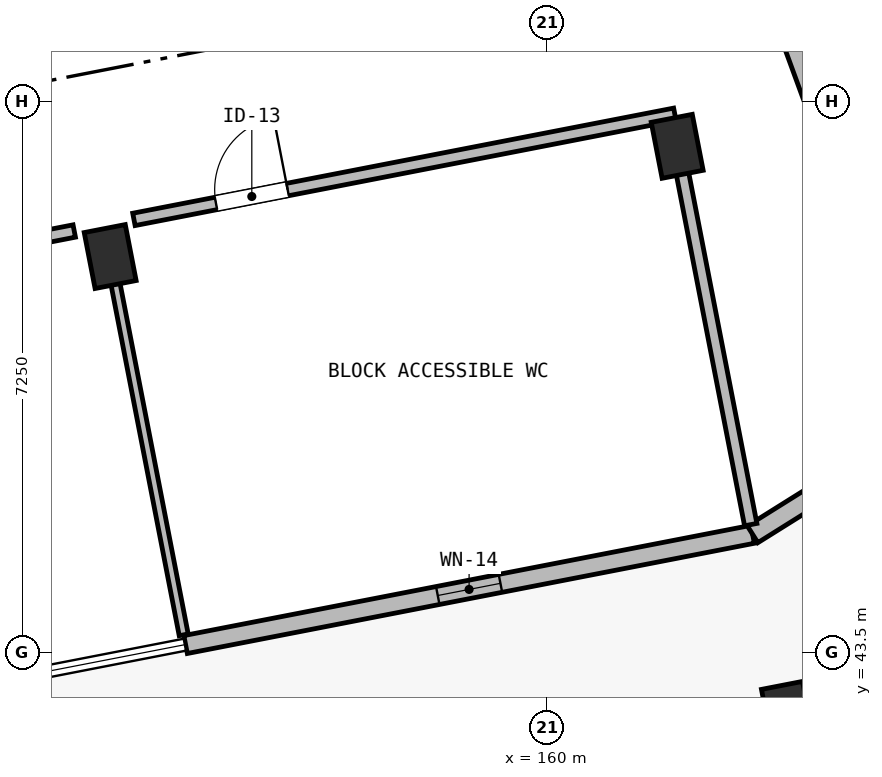
"""IFC4 building model, lengths in metres.
Left out: names, types, materials, properties, quantities, classifications, styles, units other than length and angle.
Written with IfcOpenShell. Run it as: python <this file> out.ifc"""

import sys

from ifc_helpers import new_model, si_unit, direction, frame, frame_2d, origin, origin_2d, place, context, subcontext, project, spatial, rectangle, extrude, element, fill, save


model = new_model("IFC4")
c1 = context("Model", 3, precision=1e-05, world=origin(), true_north=direction((0.0, 1.0)))
c2 = subcontext(c1, "Body", "Model", "MODEL_VIEW")
j1 = project(units=[si_unit("LENGTHUNIT", "METRE"), si_unit("PLANEANGLEUNIT", "RADIAN")], contexts=[c1])
p1 = place(None, origin())
s1 = spatial("IfcSite", under=j1, at=p1, CompositionType="ELEMENT")
p2 = place(p1, origin())
s2 = spatial("IfcBuilding", under=s1, at=p2, CompositionType="ELEMENT")
p3 = place(p2, origin())
s3 = spatial("IfcBuildingStorey", under=s2, at=p3, CompositionType="ELEMENT", Elevation=0.0)
for number, where, z_axis, x_axis in (
    (1, (154.252, 48.711, -0.35), (0.0, 0.0, 1.0), (0.982, 0.191, 0.0)),
    (2, (163.162, 42.701, -0.35), (0.0, 0.0, 1.0), (0.982, 0.191, 0.0)),
    (3, (161.712, 50.161, -0.35), (0.0, 0.0, 1.0), (0.982, 0.191, 0.0)),
):
    element("IfcColumn", number, at=place(p3, frame(where, z_axis=z_axis, x_axis=x_axis)), inside=s3, PredefinedType="COLUMN", context=c2, shape_type="SweptSolid", body=[
        extrude(rectangle(XDim=0.55, YDim=0.75, at=origin_2d()), origin(), (0.0, 0.0, 1.0), 4.85),
    ])
p4 = place(p3, frame((162.704, 45.057, 0.0), z_axis=(0.0, 0.0, 1.0), x_axis=(-0.981626422232, -0.190812911449, 0.0)))
e4 = element("IfcWall", 4, at=p4, inside=s3, PredefinedType="SOLIDWALL", context=c2, shape_type="SweptSolid", body=[
    extrude(rectangle(XDim=7.6, YDim=0.24, at=frame_2d((3.8, 0.0))), origin(), (0.0, 0.0, 1.0), 3.35),
])
p5 = place(p4, frame((3.38, 0.0, 0.55)))
e5 = element("IfcOpeningElement", 5, at=p5, cuts=e4, PredefinedType="OPENING", context=c2, shape_type="SweptSolid", body=[
    extrude(rectangle(XDim=0.84, YDim=2.28, at=frame_2d((0.42, 1.14))), frame((0.0, 0.135, 0.0), z_axis=(0.0, -1.0, 0.0), x_axis=(1.0, 0.0, 0.0)), (0.0, 0.0, 1.0), 0.27),
])
p6 = place(p3, frame((159.422, 61.941, 0.0), z_axis=(0.0, 0.0, 1.0), x_axis=(0.3439512016, -0.938987524368, 0.0)))
e6 = element("IfcWall", 6, at=p6, inside=s3, PredefinedType="SOLIDWALL", context=c2, shape_type="SweptSolid", body=[
    extrude(rectangle(XDim=16.407, YDim=0.26, at=frame_2d((8.204, 0.0))), origin(), (0.0, 0.0, 1.0), 3.35),
])
p7 = place(p3, frame((165.066, 46.534, 0.0), z_axis=(0.0, 0.0, 1.0), x_axis=(-0.84772244565, -0.53044005801, 0.0)))
e7 = element("IfcWall", 7, at=p7, inside=s3, PredefinedType="SOLIDWALL", context=c2, shape_type="SweptSolid", body=[
    extrude(rectangle(XDim=2.785, YDim=0.26, at=frame_2d((1.393, 0.0))), origin(), (0.0, 0.0, 1.0), 3.85),
])
p8 = place(p3, frame((147.104, 47.75, 0.0), z_axis=(0.0, 0.0, 1.0), x_axis=(0.981624170853, 0.190824493182, 0.0)))
e8 = element("IfcWall", 8, at=p8, inside=s3, PredefinedType="PLUMBINGWALL", context=c2, shape_type="SweptSolid", body=[
    extrude(rectangle(XDim=6.8, YDim=0.165, at=frame_2d((3.4, 0.0))), origin(), (0.0, 0.0, 1.0), 4.22),
])
p9 = place(p8, frame((1.1, 0.0, 0.0)))
e9 = element("IfcOpeningElement", 9, at=p9, cuts=e8, PredefinedType="OPENING", context=c2, shape_type="SweptSolid", body=[
    extrude(rectangle(XDim=0.86, YDim=2.1, at=frame_2d((0.43, 1.05))), frame((0.0, 0.097, 0.0), z_axis=(0.0, -1.0, 0.0), x_axis=(1.0, 0.0, 0.0)), (0.0, 0.0, 1.0), 0.195),
])
p10 = place(p3, frame((154.564, 49.2, 0.0), z_axis=(0.0, 0.0, 1.0), x_axis=(0.981628356687, 0.190802959485, 0.0)))
e10 = element("IfcWall", 10, at=p10, inside=s3, PredefinedType="PLUMBINGWALL", context=c2, shape_type="SweptSolid", body=[
    extrude(rectangle(XDim=7.25, YDim=0.165, at=frame_2d((3.625, 0.0))), origin(), (0.0, 0.0, 1.0), 4.22),
])
p11 = place(p10, frame((1.1, 0.0, 0.0)))
e11 = element("IfcOpeningElement", 11, at=p11, cuts=e10, PredefinedType="OPENING", context=c2, shape_type="SweptSolid", body=[
    extrude(rectangle(XDim=0.96, YDim=2.12, at=frame_2d((0.48, 1.06))), frame((0.0, 0.097, 0.0), z_axis=(0.0, -1.0, 0.0), x_axis=(1.0, 0.0, 0.0)), (0.0, 0.0, 1.0), 0.195),
])
p12 = place(p3, frame((155.219, 43.734, 0.0), z_axis=(0.0, 0.0, 1.0), x_axis=(-0.190784182555, 0.981632006246, 0.0)))
e12 = element("IfcWall", 12, at=p12, inside=s3, PredefinedType="PARTITIONING", context=c2, shape_type="SweptSolid", body=[
    extrude(rectangle(XDim=4.74, YDim=0.12, at=frame_2d((2.37, 0.0))), origin(), (0.0, 0.0, 1.0), 3.32),
])
p13 = place(p3, frame((162.679, 45.184, 0.0), z_axis=(0.0, 0.0, 1.0), x_axis=(-0.190824166448, 0.981624234368, 0.0)))
e13 = element("IfcWall", 13, at=p13, inside=s3, PredefinedType="PLUMBINGWALL", context=c2, shape_type="SweptSolid", body=[
    extrude(rectangle(XDim=4.74, YDim=0.165, at=frame_2d((2.37, 0.0))), origin(), (0.0, 0.0, 1.0), 3.32),
])
p14 = place(p5, origin())
e14 = element("IfcWindow", 14, at=p14, inside=s3, PartitioningType="SINGLE_PANEL", PredefinedType="WINDOW", context=c2, shape_type="SweptSolid", body=[
    extrude(rectangle(XDim=0.84, YDim=2.28, at=frame_2d((0.42, 1.14))), frame((0.0, 0.03, 0.0), z_axis=(0.0, -1.0, 0.0), x_axis=(1.0, 0.0, 0.0)), (0.0, 0.0, 1.0), 0.06),
])
fill(e5, e14)
p15 = place(p11, origin())
e15 = element("IfcDoor", 15, at=p15, inside=s3, OperationType="SINGLE_SWING_RIGHT", PredefinedType="DOOR", context=c2, shape_type="SweptSolid", body=[
    extrude(rectangle(XDim=0.96, YDim=2.12, at=frame_2d((0.48, 1.06))), frame((0.0, 0.025, 0.0), z_axis=(0.0, -1.0, 0.0), x_axis=(1.0, 0.0, 0.0)), (0.0, 0.0, 1.0), 0.05),
])
fill(e11, e15)
save(model, sys.argv[1])
